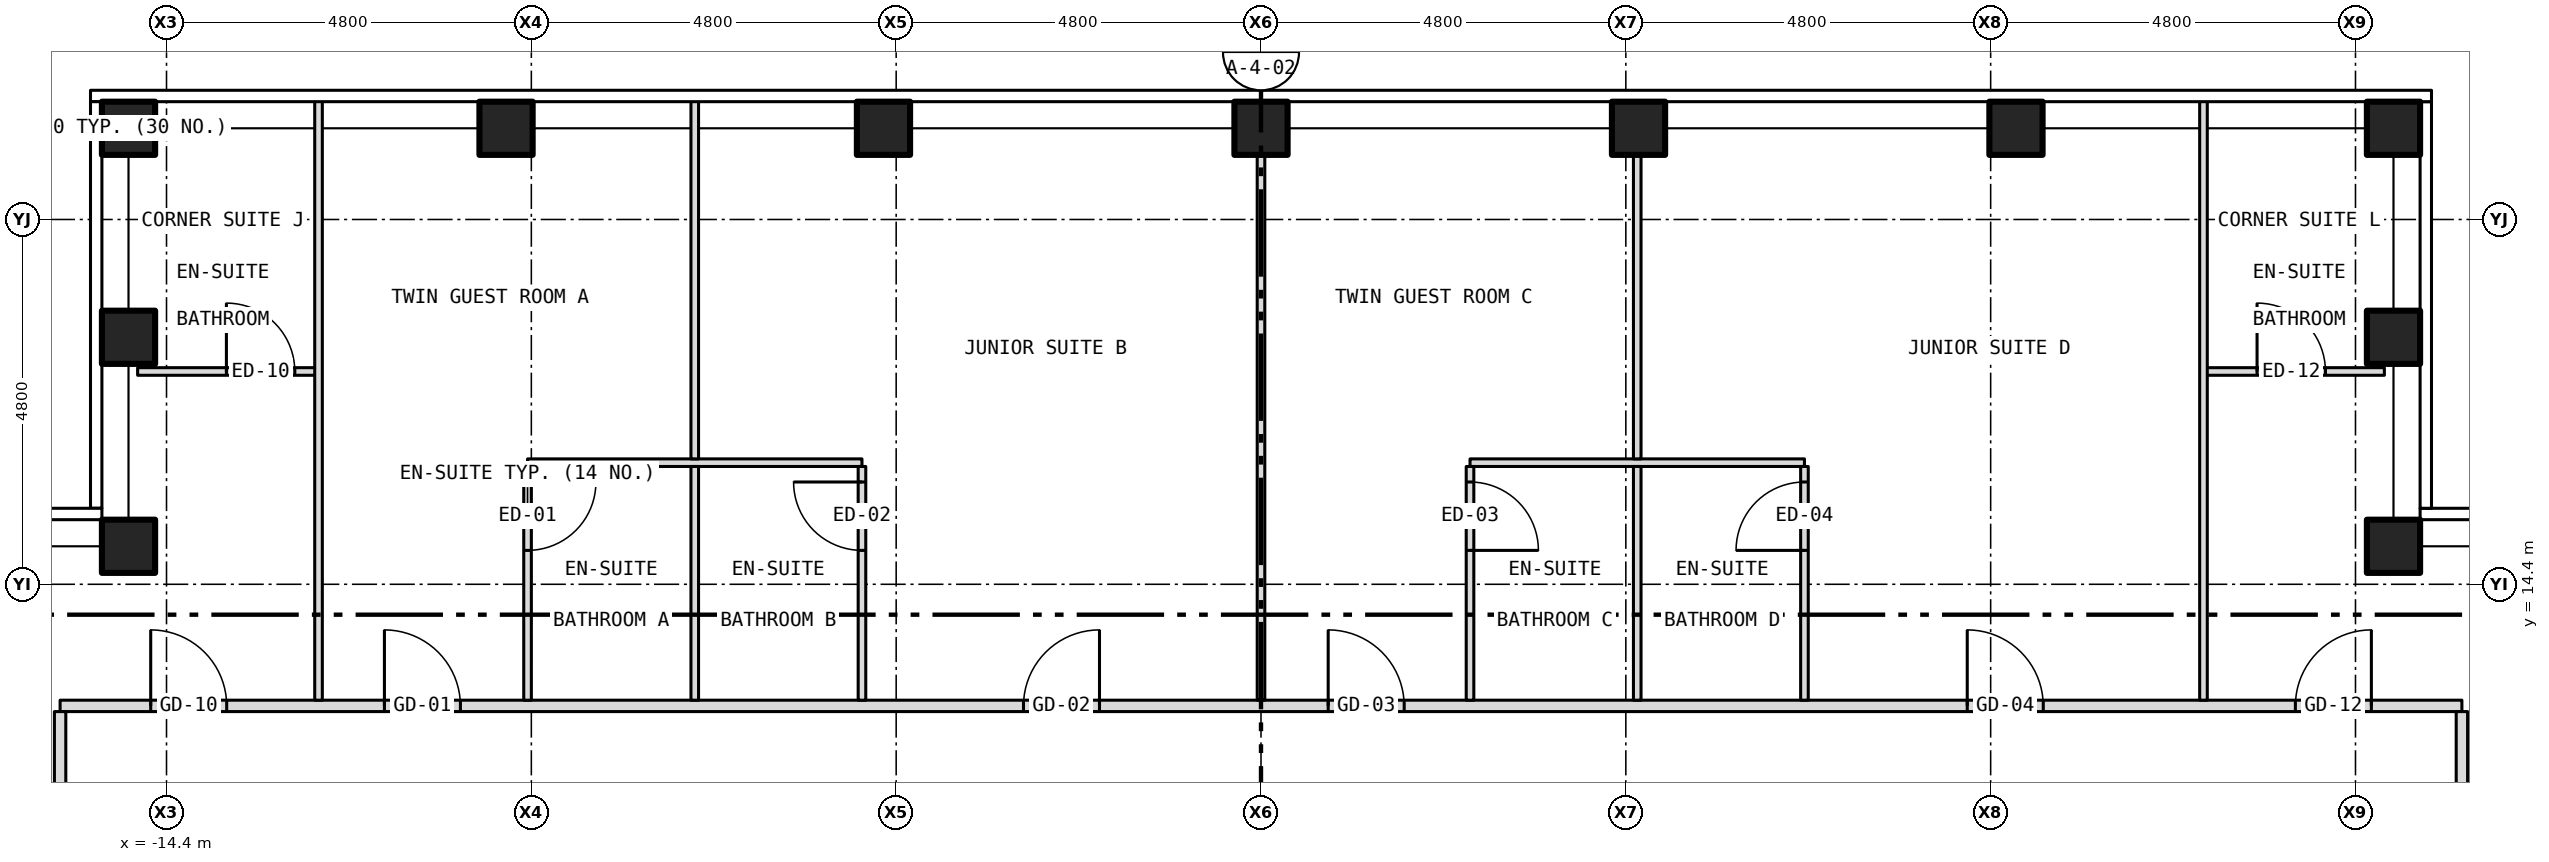
"""IFC4 building model, lengths in metres.
Left out: names, types, materials, properties, quantities, classifications, styles, units other than length and angle.
Written with IfcOpenShell. Run it as: python <this file> out.ifc"""

import sys

from ifc_helpers import new_model, si_unit, direction, frame, frame_2d, origin, origin_2d, place, context, subcontext, project, spatial, rectangle, hollow_rectangle, extrude, element, fill, save


model = new_model("IFC4")
c1 = context("Model", 3, precision=1e-05, world=origin(), true_north=direction((0.0, 1.0)))
c2 = subcontext(c1, "Body", "Model", "MODEL_VIEW")
j1 = project(units=[si_unit("LENGTHUNIT", "METRE"), si_unit("PLANEANGLEUNIT", "RADIAN")], contexts=[c1])
p1 = place(None, origin())
s1 = spatial("IfcSite", under=j1, at=p1, CompositionType="ELEMENT")
p2 = place(p1, origin())
s2 = spatial("IfcBuilding", under=s1, at=p2, CompositionType="ELEMENT")
p3 = place(p2, frame((0.0, 0.0, 205.0)))
s3 = spatial("IfcBuildingStorey", under=s2, at=p3, CompositionType="ELEMENT", Elevation=205.0)
for number, where, z_axis, x_axis in (
    (1, (-14.9, 20.4, -0.15), (0.0, 0.0, 1.0), (1.0, 0.0, 0.0)),
    (2, (-9.933, 20.4, -0.15), (0.0, 0.0, 1.0), (1.0, 0.0, 0.0)),
    (3, (-4.967, 20.4, -0.15), (0.0, 0.0, 1.0), (1.0, 0.0, 0.0)),
    (4, (0.0, 20.4, -0.15), (0.0, 0.0, 1.0), (1.0, 0.0, 0.0)),
    (5, (4.967, 20.4, -0.15), (0.0, 0.0, 1.0), (1.0, 0.0, 0.0)),
    (6, (9.933, 20.4, -0.15), (0.0, 0.0, 1.0), (1.0, 0.0, 0.0)),
    (7, (14.9, 20.4, -0.15), (0.0, 0.0, 1.0), (1.0, 0.0, 0.0)),
    (8, (-14.9, 14.9, -0.15), (0.0, 0.0, 1.0), (1.0, 0.0, 0.0)),
    (9, (-14.9, 17.65, -0.15), (0.0, 0.0, 1.0), (1.0, 0.0, 0.0)),
    (10, (14.9, 14.9, -0.15), (0.0, 0.0, 1.0), (1.0, 0.0, 0.0)),
    (11, (14.9, 17.65, -0.15), (0.0, 0.0, 1.0), (1.0, 0.0, 0.0)),
):
    element("IfcColumn", number, at=place(p3, frame(where, z_axis=z_axis, x_axis=x_axis)), inside=s3, PredefinedType="COLUMN", context=c2, shape_type="SweptSolid", body=[
        extrude(hollow_rectangle(XDim=0.7, YDim=0.7, WallThickness=0.04, at=origin_2d()), origin(), (0.0, 0.0, 1.0), 3.5),
    ])
p4 = place(p3, frame((-15.8, 12.8, 0.0), z_axis=(0.0, 0.0, 1.0), x_axis=(1.0, 0.0, 0.0)))
e12 = element("IfcWall", 12, at=p4, inside=s3, PredefinedType="PARTITIONING", context=c2, shape_type="SweptSolid", body=[
    extrude(rectangle(XDim=31.6, YDim=0.15, at=frame_2d((15.8, 0.0))), origin(), (0.0, 0.0, 1.0), 3.35),
])
p5 = place(p4, frame((4.267, 0.0, 0.0)))
e13 = element("IfcOpeningElement", 13, at=p5, cuts=e12, PredefinedType="OPENING", context=c2, shape_type="SweptSolid", body=[
    extrude(rectangle(XDim=1.0, YDim=2.1, at=frame_2d((0.5, 1.05))), frame((0.0, 0.087, 0.0), z_axis=(0.0, -1.0, 0.0), x_axis=(1.0, 0.0, 0.0)), (0.0, 0.0, 1.0), 0.174),
])
p6 = place(p4, frame((12.675, 0.0, 0.0)))
e14 = element("IfcOpeningElement", 14, at=p6, cuts=e12, PredefinedType="OPENING", context=c2, shape_type="SweptSolid", body=[
    extrude(rectangle(XDim=1.0, YDim=2.1, at=frame_2d((0.5, 1.05))), frame((0.0, 0.087, 0.0), z_axis=(0.0, -1.0, 0.0), x_axis=(1.0, 0.0, 0.0)), (0.0, 0.0, 1.0), 0.174),
])
p7 = place(p4, frame((16.684, 0.0, 0.0)))
e15 = element("IfcOpeningElement", 15, at=p7, cuts=e12, PredefinedType="OPENING", context=c2, shape_type="SweptSolid", body=[
    extrude(rectangle(XDim=1.0, YDim=2.1, at=frame_2d((0.5, 1.05))), frame((0.0, 0.087, 0.0), z_axis=(0.0, -1.0, 0.0), x_axis=(1.0, 0.0, 0.0)), (0.0, 0.0, 1.0), 0.174),
])
p8 = place(p4, frame((25.092, 0.0, 0.0)))
e16 = element("IfcOpeningElement", 16, at=p8, cuts=e12, PredefinedType="OPENING", context=c2, shape_type="SweptSolid", body=[
    extrude(rectangle(XDim=1.0, YDim=2.1, at=frame_2d((0.5, 1.05))), frame((0.0, 0.087, 0.0), z_axis=(0.0, -1.0, 0.0), x_axis=(1.0, 0.0, 0.0)), (0.0, 0.0, 1.0), 0.174),
])
p9 = place(p4, frame((1.192, 0.0, 0.0)))
e17 = element("IfcOpeningElement", 17, at=p9, cuts=e12, PredefinedType="OPENING", context=c2, shape_type="SweptSolid", body=[
    extrude(rectangle(XDim=1.0, YDim=2.1, at=frame_2d((0.5, 1.05))), frame((0.0, 0.087, 0.0), z_axis=(0.0, -1.0, 0.0), x_axis=(1.0, 0.0, 0.0)), (0.0, 0.0, 1.0), 0.174),
])
p10 = place(p4, frame((29.409, 0.0, 0.0)))
e18 = element("IfcOpeningElement", 18, at=p10, cuts=e12, PredefinedType="OPENING", context=c2, shape_type="SweptSolid", body=[
    extrude(rectangle(XDim=1.0, YDim=2.1, at=frame_2d((0.5, 1.05))), frame((0.0, 0.087, 0.0), z_axis=(0.0, -1.0, 0.0), x_axis=(1.0, 0.0, 0.0)), (0.0, 0.0, 1.0), 0.174),
])
for number, where, z_axis, x_axis in (
    (19, (-9.65, 16.0, 0.0), (0.0, 0.0, 1.0), (1.0, 0.0, 0.0)),
    (20, (2.75, 16.0, 0.0), (0.0, 0.0, 1.0), (1.0, 0.0, 0.0)),
):
    element("IfcWall", number, at=place(p3, frame(where, z_axis=z_axis, x_axis=x_axis)), inside=s3, PredefinedType="PARTITIONING", context=c2, shape_type="SweptSolid", body=[
        extrude(rectangle(XDim=4.4, YDim=0.1, at=frame_2d((2.2, 0.0))), origin(), (0.0, 0.0, 1.0), 3.35),
    ])
p11 = place(p3, frame((-14.78, 17.2, 0.0), z_axis=(0.0, 0.0, 1.0), x_axis=(1.0, 0.0, 0.0)))
e21 = element("IfcWall", 21, at=p11, inside=s3, PredefinedType="PARTITIONING", context=c2, shape_type="SweptSolid", body=[
    extrude(rectangle(XDim=2.38, YDim=0.1, at=frame_2d((1.19, 0.0))), origin(), (0.0, 0.0, 1.0), 3.35),
])
p12 = place(p11, frame((1.168, 0.0, 0.0)))
e22 = element("IfcOpeningElement", 22, at=p12, cuts=e21, PredefinedType="OPENING", context=c2, shape_type="SweptSolid", body=[
    extrude(rectangle(XDim=0.9, YDim=2.1, at=frame_2d((0.45, 1.05))), frame((0.0, 0.062, 0.0), z_axis=(0.0, -1.0, 0.0), x_axis=(1.0, 0.0, 0.0)), (0.0, 0.0, 1.0), 0.124),
])
p13 = place(p3, frame((12.4, 17.2, 0.0), z_axis=(0.0, 0.0, 1.0), x_axis=(1.0, 0.0, 0.0)))
e23 = element("IfcWall", 23, at=p13, inside=s3, PredefinedType="PARTITIONING", context=c2, shape_type="SweptSolid", body=[
    extrude(rectangle(XDim=2.38, YDim=0.1, at=frame_2d((1.19, 0.0))), origin(), (0.0, 0.0, 1.0), 3.35),
])
p14 = place(p13, frame((0.705, 0.0, 0.0)))
e24 = element("IfcOpeningElement", 24, at=p14, cuts=e23, PredefinedType="OPENING", context=c2, shape_type="SweptSolid", body=[
    extrude(rectangle(XDim=0.9, YDim=2.1, at=frame_2d((0.45, 1.05))), frame((0.0, 0.062, 0.0), z_axis=(0.0, -1.0, 0.0), x_axis=(1.0, 0.0, 0.0)), (0.0, 0.0, 1.0), 0.124),
])
p15 = place(p3, frame((-15.8, 10.92, 0.0), z_axis=(0.0, 0.0, 1.0), x_axis=(0.0, 1.0, 0.0)))
e25 = element("IfcWall", 25, at=p15, inside=s3, PredefinedType="PARTITIONING", context=c2, shape_type="SweptSolid", body=[
    extrude(rectangle(XDim=1.805, YDim=0.15, at=frame_2d((0.903, 0.0))), origin(), (0.0, 0.0, 1.0), 3.35),
])
p16 = place(p3, frame((-12.4, 12.875, 0.0), z_axis=(0.0, 0.0, 1.0), x_axis=(0.0, 1.0, 0.0)))
e26 = element("IfcWall", 26, at=p16, inside=s3, PredefinedType="PARTITIONING", context=c2, shape_type="SweptSolid", body=[
    extrude(rectangle(XDim=7.905, YDim=0.1, at=frame_2d((3.953, 0.0))), origin(), (0.0, 0.0, 1.0), 3.35),
])
p17 = place(p3, frame((-9.65, 12.875, 0.0), z_axis=(0.0, 0.0, 1.0), x_axis=(0.0, 1.0, 0.0)))
e27 = element("IfcWall", 27, at=p17, inside=s3, PredefinedType="PARTITIONING", context=c2, shape_type="SweptSolid", body=[
    extrude(rectangle(XDim=3.075, YDim=0.1, at=frame_2d((1.538, 0.0))), origin(), (0.0, 0.0, 1.0), 2.728),
])
p18 = place(p17, frame((1.971, 0.0, 0.0)))
e28 = element("IfcOpeningElement", 28, at=p18, cuts=e27, PredefinedType="OPENING", context=c2, shape_type="SweptSolid", body=[
    extrude(rectangle(XDim=0.9, YDim=2.1, at=frame_2d((0.45, 1.05))), frame((0.0, 0.062, 0.0), z_axis=(0.0, -1.0, 0.0), x_axis=(1.0, 0.0, 0.0)), (0.0, 0.0, 1.0), 0.124),
])
p19 = place(p3, frame((-7.45, 12.875, 0.0), z_axis=(0.0, 0.0, 1.0), x_axis=(0.0, 1.0, 0.0)))
e29 = element("IfcWall", 29, at=p19, inside=s3, PredefinedType="PARTITIONING", context=c2, shape_type="SweptSolid", body=[
    extrude(rectangle(XDim=3.075, YDim=0.1, at=frame_2d((1.538, 0.0))), origin(), (0.0, 0.0, 1.0), 3.35),
])
p20 = place(p3, frame((-7.45, 16.05, 0.0), z_axis=(0.0, 0.0, 1.0), x_axis=(0.0, 1.0, 0.0)))
e30 = element("IfcWall", 30, at=p20, inside=s3, PredefinedType="PARTITIONING", context=c2, shape_type="SweptSolid", body=[
    extrude(rectangle(XDim=4.73, YDim=0.1, at=frame_2d((2.365, 0.0))), origin(), (0.0, 0.0, 1.0), 3.35),
])
p21 = place(p3, frame((-5.25, 12.875, 0.0), z_axis=(0.0, 0.0, 1.0), x_axis=(0.0, 1.0, 0.0)))
e31 = element("IfcWall", 31, at=p21, inside=s3, PredefinedType="PARTITIONING", context=c2, shape_type="SweptSolid", body=[
    extrude(rectangle(XDim=3.075, YDim=0.1, at=frame_2d((1.538, 0.0))), origin(), (0.0, 0.0, 1.0), 3.35),
])
p22 = place(p21, frame((1.971, 0.0, 0.0)))
e32 = element("IfcOpeningElement", 32, at=p22, cuts=e31, PredefinedType="OPENING", context=c2, shape_type="SweptSolid", body=[
    extrude(rectangle(XDim=0.9, YDim=2.1, at=frame_2d((0.45, 1.05))), frame((0.0, 0.062, 0.0), z_axis=(0.0, -1.0, 0.0), x_axis=(1.0, 0.0, 0.0)), (0.0, 0.0, 1.0), 0.124),
])
p23 = place(p3, frame((0.0, 12.875, 0.0), z_axis=(0.0, 0.0, 1.0), x_axis=(0.0, 1.0, 0.0)))
e33 = element("IfcWall", 33, at=p23, inside=s3, PredefinedType="PARTITIONING", context=c2, shape_type="SweptSolid", body=[
    extrude(rectangle(XDim=7.405, YDim=0.1, at=frame_2d((3.703, 0.0))), origin(), (0.0, 0.0, 1.0), 2.728),
])
p24 = place(p3, frame((2.75, 12.875, 0.0), z_axis=(0.0, 0.0, 1.0), x_axis=(0.0, 1.0, 0.0)))
e34 = element("IfcWall", 34, at=p24, inside=s3, PredefinedType="PARTITIONING", context=c2, shape_type="SweptSolid", body=[
    extrude(rectangle(XDim=3.075, YDim=0.1, at=frame_2d((1.538, 0.0))), origin(), (0.0, 0.0, 1.0), 3.35),
])
p25 = place(p24, frame((1.971, 0.0, 0.0)))
e35 = element("IfcOpeningElement", 35, at=p25, cuts=e34, PredefinedType="OPENING", context=c2, shape_type="SweptSolid", body=[
    extrude(rectangle(XDim=0.9, YDim=2.1, at=frame_2d((0.45, 1.05))), frame((0.0, 0.062, 0.0), z_axis=(0.0, -1.0, 0.0), x_axis=(1.0, 0.0, 0.0)), (0.0, 0.0, 1.0), 0.124),
])
p26 = place(p3, frame((4.95, 12.875, 0.0), z_axis=(0.0, 0.0, 1.0), x_axis=(0.0, 1.0, 0.0)))
e36 = element("IfcWall", 36, at=p26, inside=s3, PredefinedType="PARTITIONING", context=c2, shape_type="SweptSolid", body=[
    extrude(rectangle(XDim=3.075, YDim=0.1, at=frame_2d((1.538, 0.0))), origin(), (0.0, 0.0, 1.0), 2.817),
])
p27 = place(p3, frame((4.95, 16.05, 0.0), z_axis=(0.0, 0.0, 1.0), x_axis=(0.0, 1.0, 0.0)))
e37 = element("IfcWall", 37, at=p27, inside=s3, PredefinedType="PARTITIONING", context=c2, shape_type="SweptSolid", body=[
    extrude(rectangle(XDim=4.23, YDim=0.1, at=frame_2d((2.115, 0.0))), origin(), (0.0, 0.0, 1.0), 2.817),
])
p28 = place(p3, frame((7.15, 12.875, 0.0), z_axis=(0.0, 0.0, 1.0), x_axis=(0.0, 1.0, 0.0)))
e38 = element("IfcWall", 38, at=p28, inside=s3, PredefinedType="PARTITIONING", context=c2, shape_type="SweptSolid", body=[
    extrude(rectangle(XDim=3.075, YDim=0.1, at=frame_2d((1.538, 0.0))), origin(), (0.0, 0.0, 1.0), 3.35),
])
p29 = place(p28, frame((1.971, 0.0, 0.0)))
e39 = element("IfcOpeningElement", 39, at=p29, cuts=e38, PredefinedType="OPENING", context=c2, shape_type="SweptSolid", body=[
    extrude(rectangle(XDim=0.9, YDim=2.1, at=frame_2d((0.45, 1.05))), frame((0.0, 0.062, 0.0), z_axis=(0.0, -1.0, 0.0), x_axis=(1.0, 0.0, 0.0)), (0.0, 0.0, 1.0), 0.124),
])
p30 = place(p3, frame((12.4, 12.875, 0.0), z_axis=(0.0, 0.0, 1.0), x_axis=(0.0, 1.0, 0.0)))
e40 = element("IfcWall", 40, at=p30, inside=s3, PredefinedType="PARTITIONING", context=c2, shape_type="SweptSolid", body=[
    extrude(rectangle(XDim=7.905, YDim=0.1, at=frame_2d((3.953, 0.0))), origin(), (0.0, 0.0, 1.0), 3.35),
])
p31 = place(p3, frame((15.8, 10.92, 0.0), z_axis=(0.0, 0.0, 1.0), x_axis=(0.0, 1.0, 0.0)))
e41 = element("IfcWall", 41, at=p31, inside=s3, PredefinedType="PARTITIONING", context=c2, shape_type="SweptSolid", body=[
    extrude(rectangle(XDim=1.805, YDim=0.15, at=frame_2d((0.903, 0.0))), origin(), (0.0, 0.0, 1.0), 3.35),
])
p32 = place(p5, origin())
e42 = element("IfcDoor", 42, at=p32, inside=s3, OperationType="SINGLE_SWING_LEFT", PredefinedType="DOOR", context=c2, shape_type="SweptSolid", body=[
    extrude(rectangle(XDim=1.0, YDim=2.1, at=frame_2d((0.5, 1.05))), frame((0.0, 0.025, 0.0), z_axis=(0.0, -1.0, 0.0), x_axis=(1.0, 0.0, 0.0)), (0.0, 0.0, 1.0), 0.05),
])
fill(e13, e42)
p33 = place(p18, origin())
e43 = element("IfcDoor", 43, at=p33, inside=s3, OperationType="SINGLE_SWING_RIGHT", PredefinedType="DOOR", context=c2, shape_type="SweptSolid", body=[
    extrude(rectangle(XDim=0.9, YDim=2.1, at=frame_2d((0.45, 1.05))), frame((0.0, 0.025, 0.0), z_axis=(0.0, -1.0, 0.0), x_axis=(1.0, 0.0, 0.0)), (0.0, 0.0, 1.0), 0.05),
])
fill(e28, e43)
p34 = place(p6, origin())
e44 = element("IfcDoor", 44, at=p34, inside=s3, OperationType="SINGLE_SWING_RIGHT", PredefinedType="DOOR", context=c2, shape_type="SweptSolid", body=[
    extrude(rectangle(XDim=1.0, YDim=2.1, at=frame_2d((0.5, 1.05))), frame((0.0, 0.025, 0.0), z_axis=(0.0, -1.0, 0.0), x_axis=(1.0, 0.0, 0.0)), (0.0, 0.0, 1.0), 0.05),
])
fill(e14, e44)
p35 = place(p22, origin())
e45 = element("IfcDoor", 45, at=p35, inside=s3, OperationType="SINGLE_SWING_RIGHT", PredefinedType="DOOR", context=c2, shape_type="SweptSolid", body=[
    extrude(rectangle(XDim=0.9, YDim=2.1, at=frame_2d((0.45, 1.05))), frame((0.0, 0.025, 0.0), z_axis=(0.0, -1.0, 0.0), x_axis=(1.0, 0.0, 0.0)), (0.0, 0.0, 1.0), 0.05),
])
fill(e32, e45)
p36 = place(p7, origin())
e46 = element("IfcDoor", 46, at=p36, inside=s3, OperationType="SINGLE_SWING_LEFT", PredefinedType="DOOR", context=c2, shape_type="SweptSolid", body=[
    extrude(rectangle(XDim=1.0, YDim=2.1, at=frame_2d((0.5, 1.05))), frame((0.0, 0.025, 0.0), z_axis=(0.0, -1.0, 0.0), x_axis=(1.0, 0.0, 0.0)), (0.0, 0.0, 1.0), 0.05),
])
fill(e15, e46)
p37 = place(p25, origin())
e47 = element("IfcDoor", 47, at=p37, inside=s3, OperationType="SINGLE_SWING_LEFT", PredefinedType="DOOR", context=c2, shape_type="SweptSolid", body=[
    extrude(rectangle(XDim=0.9, YDim=2.1, at=frame_2d((0.45, 1.05))), frame((0.0, 0.025, 0.0), z_axis=(0.0, -1.0, 0.0), x_axis=(1.0, 0.0, 0.0)), (0.0, 0.0, 1.0), 0.05),
])
fill(e35, e47)
p38 = place(p8, origin())
e48 = element("IfcDoor", 48, at=p38, inside=s3, OperationType="SINGLE_SWING_LEFT", PredefinedType="DOOR", context=c2, shape_type="SweptSolid", body=[
    extrude(rectangle(XDim=1.0, YDim=2.1, at=frame_2d((0.5, 1.05))), frame((0.0, 0.025, 0.0), z_axis=(0.0, -1.0, 0.0), x_axis=(1.0, 0.0, 0.0)), (0.0, 0.0, 1.0), 0.05),
])
fill(e16, e48)
p39 = place(p29, origin())
e49 = element("IfcDoor", 49, at=p39, inside=s3, OperationType="SINGLE_SWING_LEFT", PredefinedType="DOOR", context=c2, shape_type="SweptSolid", body=[
    extrude(rectangle(XDim=0.9, YDim=2.1, at=frame_2d((0.45, 1.05))), frame((0.0, 0.025, 0.0), z_axis=(0.0, -1.0, 0.0), x_axis=(1.0, 0.0, 0.0)), (0.0, 0.0, 1.0), 0.05),
])
fill(e39, e49)
p40 = place(p12, origin())
e50 = element("IfcDoor", 50, at=p40, inside=s3, OperationType="SINGLE_SWING_LEFT", PredefinedType="DOOR", context=c2, shape_type="SweptSolid", body=[
    extrude(rectangle(XDim=0.9, YDim=2.1, at=frame_2d((0.45, 1.05))), frame((0.0, 0.025, 0.0), z_axis=(0.0, -1.0, 0.0), x_axis=(1.0, 0.0, 0.0)), (0.0, 0.0, 1.0), 0.05),
])
fill(e22, e50)
p41 = place(p9, origin())
e51 = element("IfcDoor", 51, at=p41, inside=s3, OperationType="SINGLE_SWING_LEFT", PredefinedType="DOOR", context=c2, shape_type="SweptSolid", body=[
    extrude(rectangle(XDim=1.0, YDim=2.1, at=frame_2d((0.5, 1.05))), frame((0.0, 0.025, 0.0), z_axis=(0.0, -1.0, 0.0), x_axis=(1.0, 0.0, 0.0)), (0.0, 0.0, 1.0), 0.05),
])
fill(e17, e51)
p42 = place(p14, origin())
e52 = element("IfcDoor", 52, at=p42, inside=s3, OperationType="SINGLE_SWING_LEFT", PredefinedType="DOOR", context=c2, shape_type="SweptSolid", body=[
    extrude(rectangle(XDim=0.9, YDim=2.1, at=frame_2d((0.45, 1.05))), frame((0.0, 0.025, 0.0), z_axis=(0.0, -1.0, 0.0), x_axis=(1.0, 0.0, 0.0)), (0.0, 0.0, 1.0), 0.05),
])
fill(e24, e52)
p43 = place(p10, origin())
e53 = element("IfcDoor", 53, at=p43, inside=s3, OperationType="SINGLE_SWING_RIGHT", PredefinedType="DOOR", context=c2, shape_type="SweptSolid", body=[
    extrude(rectangle(XDim=1.0, YDim=2.1, at=frame_2d((0.5, 1.05))), frame((0.0, 0.025, 0.0), z_axis=(0.0, -1.0, 0.0), x_axis=(1.0, 0.0, 0.0)), (0.0, 0.0, 1.0), 0.05),
])
fill(e18, e53)
save(model, sys.argv[1])
